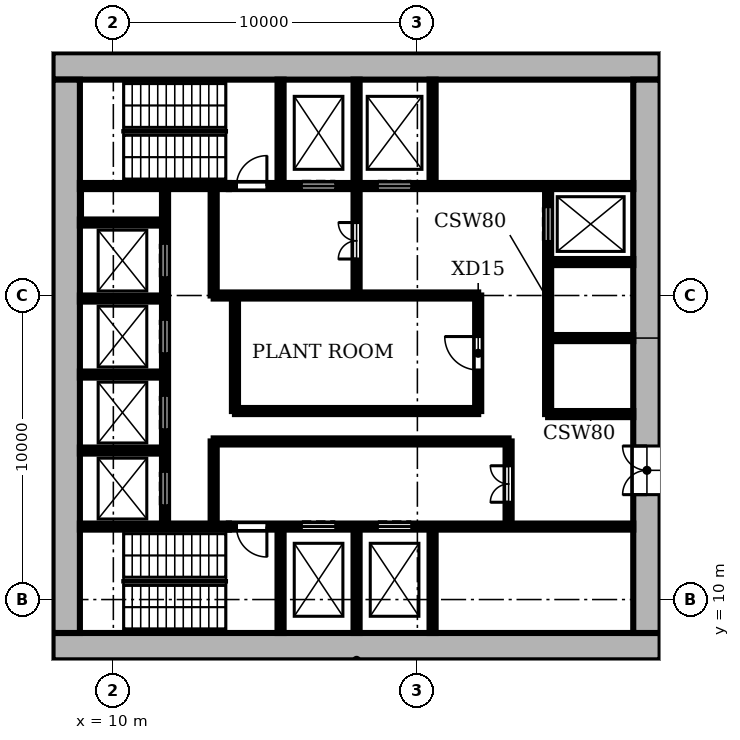
"""IFC4 building model, lengths in metres.
Left out: names, types, materials, properties, quantities, classifications, styles, units other than length and angle.
Written with IfcOpenShell. Run it as: python <this file> out.ifc"""

import sys

from ifc_helpers import new_model, si_unit, direction, frame, frame_2d, origin, place, context, subcontext, project, spatial, rectangle, extrude, element, fill, save


model = new_model("IFC4")
c1 = context("Model", 3, precision=1e-05, world=origin(), true_north=direction((0.0, 1.0)))
c2 = subcontext(c1, "Body", "Model", "MODEL_VIEW")
j1 = project(units=[si_unit("LENGTHUNIT", "METRE"), si_unit("PLANEANGLEUNIT", "RADIAN")], contexts=[c1])
p1 = place(None, origin())
s1 = spatial("IfcSite", under=j1, at=p1, CompositionType="ELEMENT")
p2 = place(p1, origin())
s2 = spatial("IfcBuilding", under=s1, at=p2, CompositionType="ELEMENT")
p3 = place(p2, frame((0.0, 0.0, -4.5)))
s3 = spatial("IfcBuildingStorey", under=s2, at=p3, CompositionType="ELEMENT", Elevation=-4.5)
p4 = place(p3, frame((8.0, 8.45, 0.0), z_axis=(0.0, 0.0, 1.0), x_axis=(1.0, 0.0, 0.0)))
e1 = element("IfcWall", 1, at=p4, inside=s3, PredefinedType="SHEAR", context=c2, shape_type="SweptSolid", body=[
    extrude(rectangle(XDim=20.0, YDim=0.9, at=frame_2d((10.0, 0.0))), origin(), (0.0, 0.0, 1.0), 4.5),
])
p5 = place(p3, frame((27.55, 8.9, 0.0), z_axis=(0.0, 0.0, 1.0), x_axis=(0.0, 1.0, 0.0)))
e2 = element("IfcWall", 2, at=p5, inside=s3, PredefinedType="SHEAR", context=c2, shape_type="SweptSolid", body=[
    extrude(rectangle(XDim=18.2, YDim=0.9, at=frame_2d((9.1, 0.0))), origin(), (0.0, 0.0, 1.0), 4.5),
])
p6 = place(p5, frame((4.55, 0.0, 0.0)))
e3 = element("IfcOpeningElement", 3, at=p6, cuts=e2, PredefinedType="OPENING", context=c2, shape_type="SweptSolid", body=[
    extrude(rectangle(XDim=1.6, YDim=2.1, at=frame_2d((0.8, 1.05))), frame((0.0, 0.46, 0.0), z_axis=(0.0, -1.0, 0.0), x_axis=(1.0, 0.0, 0.0)), (0.0, 0.0, 1.0), 0.92),
])
p7 = place(p3, frame((28.0, 27.55, 0.0), z_axis=(0.0, 0.0, 1.0), x_axis=(-1.0, 0.0, 0.0)))
e4 = element("IfcWall", 4, at=p7, inside=s3, PredefinedType="SHEAR", context=c2, shape_type="SweptSolid", body=[
    extrude(rectangle(XDim=20.0, YDim=0.9, at=frame_2d((10.0, 0.0))), origin(), (0.0, 0.0, 1.0), 4.5),
])
p8 = place(p3, frame((8.45, 27.1, 0.0), z_axis=(0.0, 0.0, 1.0), x_axis=(0.0, -1.0, 0.0)))
e5 = element("IfcWall", 5, at=p8, inside=s3, PredefinedType="SHEAR", context=c2, shape_type="SweptSolid", body=[
    extrude(rectangle(XDim=18.2, YDim=0.9, at=frame_2d((9.1, 0.0))), origin(), (0.0, 0.0, 1.0), 4.5),
])
p9 = place(p3, frame((8.9, 12.4, 0.0), z_axis=(0.0, 0.0, 1.0), x_axis=(1.0, 0.0, 0.0)))
e6 = element("IfcWall", 6, at=p9, inside=s3, PredefinedType="SHEAR", context=c2, shape_type="SweptSolid", body=[
    extrude(rectangle(XDim=4.9, YDim=0.2, at=frame_2d((2.45, 0.0))), origin(), (0.0, 0.0, 1.0), 4.05),
])
p10 = place(p3, frame((13.8, 12.4, 0.0), z_axis=(0.0, 0.0, 1.0), x_axis=(1.0, 0.0, 0.0)))
e7 = element("IfcWall", 7, at=p10, inside=s3, PredefinedType="SHEAR", context=c2, shape_type="SweptSolid", body=[
    extrude(rectangle(XDim=13.3, YDim=0.2, at=frame_2d((6.65, 0.0))), origin(), (0.0, 0.0, 1.0), 4.05),
])
p11 = place(p10, frame((2.4, 0.0, 0.0)))
e8 = element("IfcOpeningElement", 8, at=p11, cuts=e7, PredefinedType="OPENING", context=c2, shape_type="SweptSolid", body=[
    extrude(rectangle(XDim=1.1, YDim=2.1, at=frame_2d((0.55, 1.05))), frame((0.0, 0.11, 0.0), z_axis=(0.0, -1.0, 0.0), x_axis=(1.0, 0.0, 0.0)), (0.0, 0.0, 1.0), 0.22),
])
p12 = place(p10, frame((4.9, 0.0, 0.0)))
e9 = element("IfcOpeningElement", 9, at=p12, cuts=e7, PredefinedType="OPENING", context=c2, shape_type="SweptSolid", body=[
    extrude(rectangle(XDim=1.1, YDim=2.1, at=frame_2d((0.55, 1.05))), frame((0.0, 0.11, 0.0), z_axis=(0.0, -1.0, 0.0), x_axis=(1.0, 0.0, 0.0)), (0.0, 0.0, 1.0), 0.22),
])
p13 = place(p10, frame((0.25, 0.0, 0.0)))
e10 = element("IfcOpeningElement", 10, at=p13, cuts=e7, PredefinedType="OPENING", context=c2, shape_type="SweptSolid", body=[
    extrude(rectangle(XDim=1.0, YDim=2.1, at=frame_2d((0.5, 1.05))), frame((0.0, 0.11, 0.0), z_axis=(0.0, -1.0, 0.0), x_axis=(1.0, 0.0, 0.0)), (0.0, 0.0, 1.0), 0.22),
])
p14 = place(p3, frame((8.9, 14.9, 0.0), z_axis=(0.0, 0.0, 1.0), x_axis=(1.0, 0.0, 0.0)))
e11 = element("IfcWall", 11, at=p14, inside=s3, PredefinedType="SHEAR", context=c2, shape_type="SweptSolid", body=[
    extrude(rectangle(XDim=2.8, YDim=0.2, at=frame_2d((1.4, 0.0))), origin(), (0.0, 0.0, 1.0), 4.05),
])
p15 = place(p3, frame((13.3, 15.2, 0.0), z_axis=(0.0, 0.0, 1.0), x_axis=(1.0, 0.0, 0.0)))
e12 = element("IfcWall", 12, at=p15, inside=s3, PredefinedType="SHEAR", context=c2, shape_type="SweptSolid", body=[
    extrude(rectangle(XDim=9.7, YDim=0.2, at=frame_2d((4.85, 0.0))), origin(), (0.0, 0.0, 1.0), 4.05),
])
p16 = place(p3, frame((24.3, 16.1, 0.0), z_axis=(0.0, 0.0, 1.0), x_axis=(1.0, 0.0, 0.0)))
e13 = element("IfcWall", 13, at=p16, inside=s3, PredefinedType="SHEAR", context=c2, shape_type="SweptSolid", body=[
    extrude(rectangle(XDim=2.8, YDim=0.2, at=frame_2d((1.4, 0.0))), origin(), (0.0, 0.0, 1.0), 4.05),
])
p17 = place(p3, frame((14.0, 16.2, 0.0), z_axis=(0.0, 0.0, 1.0), x_axis=(1.0, 0.0, 0.0)))
e14 = element("IfcWall", 14, at=p17, inside=s3, PredefinedType="SHEAR", context=c2, shape_type="SweptSolid", body=[
    extrude(rectangle(XDim=8.0, YDim=0.2, at=frame_2d((4.0, 0.0))), origin(), (0.0, 0.0, 1.0), 4.05),
])
for number, where, z_axis, x_axis in (
    (15, (8.9, 17.4, 0.0), (0.0, 0.0, 1.0), (1.0, 0.0, 0.0)),
    (16, (24.3, 18.6, 0.0), (0.0, 0.0, 1.0), (1.0, 0.0, 0.0)),
    (17, (8.9, 19.9, 0.0), (0.0, 0.0, 1.0), (1.0, 0.0, 0.0)),
):
    element("IfcWall", number, at=place(p3, frame(where, z_axis=z_axis, x_axis=x_axis)), inside=s3, PredefinedType="SHEAR", context=c2, shape_type="SweptSolid", body=[
        extrude(rectangle(XDim=2.8, YDim=0.2, at=frame_2d((1.4, 0.0))), origin(), (0.0, 0.0, 1.0), 4.05),
    ])
p18 = place(p3, frame((13.3, 20.0, 0.0), z_axis=(0.0, 0.0, 1.0), x_axis=(1.0, 0.0, 0.0)))
e18 = element("IfcWall", 18, at=p18, inside=s3, PredefinedType="SHEAR", context=c2, shape_type="SweptSolid", body=[
    extrude(rectangle(XDim=8.7, YDim=0.2, at=frame_2d((4.35, 0.0))), origin(), (0.0, 0.0, 1.0), 4.05),
])
for number, where, z_axis, x_axis in (
    (19, (24.3, 21.1, 0.0), (0.0, 0.0, 1.0), (1.0, 0.0, 0.0)),
    (20, (8.9, 22.4, 0.0), (0.0, 0.0, 1.0), (1.0, 0.0, 0.0)),
):
    element("IfcWall", number, at=place(p3, frame(where, z_axis=z_axis, x_axis=x_axis)), inside=s3, PredefinedType="SHEAR", context=c2, shape_type="SweptSolid", body=[
        extrude(rectangle(XDim=2.8, YDim=0.2, at=frame_2d((1.4, 0.0))), origin(), (0.0, 0.0, 1.0), 4.05),
    ])
p19 = place(p3, frame((8.9, 23.6, 0.0), z_axis=(0.0, 0.0, 1.0), x_axis=(1.0, 0.0, 0.0)))
e21 = element("IfcWall", 21, at=p19, inside=s3, PredefinedType="SHEAR", context=c2, shape_type="SweptSolid", body=[
    extrude(rectangle(XDim=4.9, YDim=0.2, at=frame_2d((2.45, 0.0))), origin(), (0.0, 0.0, 1.0), 4.05),
])
p20 = place(p3, frame((13.8, 23.6, 0.0), z_axis=(0.0, 0.0, 1.0), x_axis=(1.0, 0.0, 0.0)))
e22 = element("IfcWall", 22, at=p20, inside=s3, PredefinedType="SHEAR", context=c2, shape_type="SweptSolid", body=[
    extrude(rectangle(XDim=13.3, YDim=0.2, at=frame_2d((6.65, 0.0))), origin(), (0.0, 0.0, 1.0), 4.05),
])
p21 = place(p20, frame((2.4, 0.0, 0.0)))
e23 = element("IfcOpeningElement", 23, at=p21, cuts=e22, PredefinedType="OPENING", context=c2, shape_type="SweptSolid", body=[
    extrude(rectangle(XDim=1.1, YDim=2.1, at=frame_2d((0.55, 1.05))), frame((0.0, 0.11, 0.0), z_axis=(0.0, -1.0, 0.0), x_axis=(1.0, 0.0, 0.0)), (0.0, 0.0, 1.0), 0.22),
])
p22 = place(p20, frame((4.9, 0.0, 0.0)))
e24 = element("IfcOpeningElement", 24, at=p22, cuts=e22, PredefinedType="OPENING", context=c2, shape_type="SweptSolid", body=[
    extrude(rectangle(XDim=1.1, YDim=2.1, at=frame_2d((0.55, 1.05))), frame((0.0, 0.11, 0.0), z_axis=(0.0, -1.0, 0.0), x_axis=(1.0, 0.0, 0.0)), (0.0, 0.0, 1.0), 0.22),
])
p23 = place(p20, frame((0.25, 0.0, 0.0)))
e25 = element("IfcOpeningElement", 25, at=p23, cuts=e22, PredefinedType="OPENING", context=c2, shape_type="SweptSolid", body=[
    extrude(rectangle(XDim=1.0, YDim=2.1, at=frame_2d((0.5, 1.05))), frame((0.0, 0.11, 0.0), z_axis=(0.0, -1.0, 0.0), x_axis=(1.0, 0.0, 0.0)), (0.0, 0.0, 1.0), 0.22),
])
p24 = place(p3, frame((11.7, 12.4, 0.0), z_axis=(0.0, 0.0, 1.0), x_axis=(0.0, 1.0, 0.0)))
e26 = element("IfcWall", 26, at=p24, inside=s3, PredefinedType="SHEAR", context=c2, shape_type="SweptSolid", body=[
    extrude(rectangle(XDim=11.2, YDim=0.2, at=frame_2d((5.6, 0.0))), origin(), (0.0, 0.0, 1.0), 4.05),
])
p25 = place(p24, frame((0.7, 0.0, 0.0)))
e27 = element("IfcOpeningElement", 27, at=p25, cuts=e26, PredefinedType="OPENING", context=c2, shape_type="SweptSolid", body=[
    extrude(rectangle(XDim=1.1, YDim=2.1, at=frame_2d((0.55, 1.05))), frame((0.0, 0.11, 0.0), z_axis=(0.0, -1.0, 0.0), x_axis=(1.0, 0.0, 0.0)), (0.0, 0.0, 1.0), 0.22),
])
p26 = place(p24, frame((3.2, 0.0, 0.0)))
e28 = element("IfcOpeningElement", 28, at=p26, cuts=e26, PredefinedType="OPENING", context=c2, shape_type="SweptSolid", body=[
    extrude(rectangle(XDim=1.1, YDim=2.1, at=frame_2d((0.55, 1.05))), frame((0.0, 0.11, 0.0), z_axis=(0.0, -1.0, 0.0), x_axis=(1.0, 0.0, 0.0)), (0.0, 0.0, 1.0), 0.22),
])
p27 = place(p24, frame((5.7, 0.0, 0.0)))
e29 = element("IfcOpeningElement", 29, at=p27, cuts=e26, PredefinedType="OPENING", context=c2, shape_type="SweptSolid", body=[
    extrude(rectangle(XDim=1.1, YDim=2.1, at=frame_2d((0.55, 1.05))), frame((0.0, 0.11, 0.0), z_axis=(0.0, -1.0, 0.0), x_axis=(1.0, 0.0, 0.0)), (0.0, 0.0, 1.0), 0.22),
])
p28 = place(p24, frame((8.2, 0.0, 0.0)))
e30 = element("IfcOpeningElement", 30, at=p28, cuts=e26, PredefinedType="OPENING", context=c2, shape_type="SweptSolid", body=[
    extrude(rectangle(XDim=1.1, YDim=2.1, at=frame_2d((0.55, 1.05))), frame((0.0, 0.11, 0.0), z_axis=(0.0, -1.0, 0.0), x_axis=(1.0, 0.0, 0.0)), (0.0, 0.0, 1.0), 0.22),
])
p29 = place(p3, frame((13.3, 12.4, 0.0), z_axis=(0.0, 0.0, 1.0), x_axis=(0.0, 1.0, 0.0)))
e31 = element("IfcWall", 31, at=p29, inside=s3, PredefinedType="SHEAR", context=c2, shape_type="SweptSolid", body=[
    extrude(rectangle(XDim=2.8, YDim=0.2, at=frame_2d((1.4, 0.0))), origin(), (0.0, 0.0, 1.0), 4.05),
])
p30 = place(p3, frame((13.3, 20.0, 0.0), z_axis=(0.0, 0.0, 1.0), x_axis=(0.0, 1.0, 0.0)))
e32 = element("IfcWall", 32, at=p30, inside=s3, PredefinedType="SHEAR", context=c2, shape_type="SweptSolid", body=[
    extrude(rectangle(XDim=3.6, YDim=0.2, at=frame_2d((1.8, 0.0))), origin(), (0.0, 0.0, 1.0), 4.05),
])
p31 = place(p3, frame((14.0, 16.2, 0.0), z_axis=(0.0, 0.0, 1.0), x_axis=(0.0, 1.0, 0.0)))
e33 = element("IfcWall", 33, at=p31, inside=s3, PredefinedType="SHEAR", context=c2, shape_type="SweptSolid", body=[
    extrude(rectangle(XDim=3.8, YDim=0.2, at=frame_2d((1.9, 0.0))), origin(), (0.0, 0.0, 1.0), 4.05),
])
for number, where, z_axis, x_axis in (
    (34, (15.5, 8.9, 0.0), (0.0, 0.0, 1.0), (0.0, 1.0, 0.0)),
    (35, (15.5, 23.6, 0.0), (0.0, 0.0, 1.0), (0.0, 1.0, 0.0)),
    (36, (18.0, 8.9, 0.0), (0.0, 0.0, 1.0), (0.0, 1.0, 0.0)),
):
    element("IfcWall", number, at=place(p3, frame(where, z_axis=z_axis, x_axis=x_axis)), inside=s3, PredefinedType="SHEAR", context=c2, shape_type="SweptSolid", body=[
        extrude(rectangle(XDim=3.5, YDim=0.2, at=frame_2d((1.75, 0.0))), origin(), (0.0, 0.0, 1.0), 4.05),
    ])
p32 = place(p3, frame((18.0, 20.0, 0.0), z_axis=(0.0, 0.0, 1.0), x_axis=(0.0, 1.0, 0.0)))
e37 = element("IfcWall", 37, at=p32, inside=s3, PredefinedType="SHEAR", context=c2, shape_type="SweptSolid", body=[
    extrude(rectangle(XDim=7.1, YDim=0.2, at=frame_2d((3.55, 0.0))), origin(), (0.0, 0.0, 1.0), 4.05),
])
p33 = place(p32, frame((1.2, 0.0, 0.0)))
e38 = element("IfcOpeningElement", 38, at=p33, cuts=e37, PredefinedType="OPENING", context=c2, shape_type="SweptSolid", body=[
    extrude(rectangle(XDim=1.2, YDim=2.1, at=frame_2d((0.6, 1.05))), frame((0.0, 0.11, 0.0), z_axis=(0.0, -1.0, 0.0), x_axis=(1.0, 0.0, 0.0)), (0.0, 0.0, 1.0), 0.22),
])
for number, where, z_axis, x_axis in (
    (39, (20.5, 8.9, 0.0), (0.0, 0.0, 1.0), (0.0, 1.0, 0.0)),
    (40, (20.5, 23.6, 0.0), (0.0, 0.0, 1.0), (0.0, 1.0, 0.0)),
):
    element("IfcWall", number, at=place(p3, frame(where, z_axis=z_axis, x_axis=x_axis)), inside=s3, PredefinedType="SHEAR", context=c2, shape_type="SweptSolid", body=[
        extrude(rectangle(XDim=3.5, YDim=0.2, at=frame_2d((1.75, 0.0))), origin(), (0.0, 0.0, 1.0), 4.05),
    ])
p34 = place(p3, frame((22.0, 16.2, 0.0), z_axis=(0.0, 0.0, 1.0), x_axis=(0.0, 1.0, 0.0)))
e41 = element("IfcWall", 41, at=p34, inside=s3, PredefinedType="SHEAR", context=c2, shape_type="SweptSolid", body=[
    extrude(rectangle(XDim=3.8, YDim=0.2, at=frame_2d((1.9, 0.0))), origin(), (0.0, 0.0, 1.0), 4.05),
])
p35 = place(p34, frame((1.35, 0.0, 0.0)))
e42 = element("IfcOpeningElement", 42, at=p35, cuts=e41, PredefinedType="OPENING", context=c2, shape_type="SweptSolid", body=[
    extrude(rectangle(XDim=1.1, YDim=2.1, at=frame_2d((0.55, 1.05))), frame((0.0, 0.11, 0.0), z_axis=(0.0, -1.0, 0.0), x_axis=(1.0, 0.0, 0.0)), (0.0, 0.0, 1.0), 0.22),
])
p36 = place(p3, frame((23.0, 12.4, 0.0), z_axis=(0.0, 0.0, 1.0), x_axis=(0.0, 1.0, 0.0)))
e43 = element("IfcWall", 43, at=p36, inside=s3, PredefinedType="SHEAR", context=c2, shape_type="SweptSolid", body=[
    extrude(rectangle(XDim=2.8, YDim=0.2, at=frame_2d((1.4, 0.0))), origin(), (0.0, 0.0, 1.0), 4.05),
])
p37 = place(p36, frame((0.8, 0.0, 0.0)))
e44 = element("IfcOpeningElement", 44, at=p37, cuts=e43, PredefinedType="OPENING", context=c2, shape_type="SweptSolid", body=[
    extrude(rectangle(XDim=1.2, YDim=2.1, at=frame_2d((0.6, 1.05))), frame((0.0, 0.11, 0.0), z_axis=(0.0, -1.0, 0.0), x_axis=(1.0, 0.0, 0.0)), (0.0, 0.0, 1.0), 0.22),
])
p38 = place(p3, frame((24.3, 16.1, 0.0), z_axis=(0.0, 0.0, 1.0), x_axis=(0.0, 1.0, 0.0)))
e45 = element("IfcWall", 45, at=p38, inside=s3, PredefinedType="SHEAR", context=c2, shape_type="SweptSolid", body=[
    extrude(rectangle(XDim=7.5, YDim=0.2, at=frame_2d((3.75, 0.0))), origin(), (0.0, 0.0, 1.0), 4.05),
])
p39 = place(p38, frame((5.7, 0.0, 0.0)))
e46 = element("IfcOpeningElement", 46, at=p39, cuts=e45, PredefinedType="OPENING", context=c2, shape_type="SweptSolid", body=[
    extrude(rectangle(XDim=1.1, YDim=2.1, at=frame_2d((0.55, 1.05))), frame((0.0, 0.11, 0.0), z_axis=(0.0, -1.0, 0.0), x_axis=(1.0, 0.0, 0.0)), (0.0, 0.0, 1.0), 0.22),
])
p40 = place(p25, origin())
e47 = element("IfcDoor", 47, at=p40, inside=s3, OperationType="DOUBLE_DOOR_SLIDING", PredefinedType="DOOR", context=c2, shape_type="SweptSolid", body=[
    extrude(rectangle(XDim=1.1, YDim=2.1, at=frame_2d((0.55, 1.05))), frame((0.0, 0.025, 0.0), z_axis=(0.0, -1.0, 0.0), x_axis=(1.0, 0.0, 0.0)), (0.0, 0.0, 1.0), 0.05),
])
fill(e27, e47)
p41 = place(p26, origin())
e48 = element("IfcDoor", 48, at=p41, inside=s3, OperationType="DOUBLE_DOOR_SLIDING", PredefinedType="DOOR", context=c2, shape_type="SweptSolid", body=[
    extrude(rectangle(XDim=1.1, YDim=2.1, at=frame_2d((0.55, 1.05))), frame((0.0, 0.025, 0.0), z_axis=(0.0, -1.0, 0.0), x_axis=(1.0, 0.0, 0.0)), (0.0, 0.0, 1.0), 0.05),
])
fill(e28, e48)
p42 = place(p27, origin())
e49 = element("IfcDoor", 49, at=p42, inside=s3, OperationType="DOUBLE_DOOR_SLIDING", PredefinedType="DOOR", context=c2, shape_type="SweptSolid", body=[
    extrude(rectangle(XDim=1.1, YDim=2.1, at=frame_2d((0.55, 1.05))), frame((0.0, 0.025, 0.0), z_axis=(0.0, -1.0, 0.0), x_axis=(1.0, 0.0, 0.0)), (0.0, 0.0, 1.0), 0.05),
])
fill(e29, e49)
p43 = place(p28, origin())
e50 = element("IfcDoor", 50, at=p43, inside=s3, OperationType="DOUBLE_DOOR_SLIDING", PredefinedType="DOOR", context=c2, shape_type="SweptSolid", body=[
    extrude(rectangle(XDim=1.1, YDim=2.1, at=frame_2d((0.55, 1.05))), frame((0.0, 0.025, 0.0), z_axis=(0.0, -1.0, 0.0), x_axis=(1.0, 0.0, 0.0)), (0.0, 0.0, 1.0), 0.05),
])
fill(e30, e50)
p44 = place(p39, origin())
e51 = element("IfcDoor", 51, at=p44, inside=s3, OperationType="DOUBLE_DOOR_SLIDING", PredefinedType="DOOR", context=c2, shape_type="SweptSolid", body=[
    extrude(rectangle(XDim=1.1, YDim=2.1, at=frame_2d((0.55, 1.05))), frame((0.0, 0.025, 0.0), z_axis=(0.0, -1.0, 0.0), x_axis=(1.0, 0.0, 0.0)), (0.0, 0.0, 1.0), 0.05),
])
fill(e46, e51)
p45 = place(p11, origin())
e52 = element("IfcDoor", 52, at=p45, inside=s3, OperationType="DOUBLE_DOOR_SLIDING", PredefinedType="DOOR", context=c2, shape_type="SweptSolid", body=[
    extrude(rectangle(XDim=1.1, YDim=2.1, at=frame_2d((0.55, 1.05))), frame((0.0, 0.025, 0.0), z_axis=(0.0, -1.0, 0.0), x_axis=(1.0, 0.0, 0.0)), (0.0, 0.0, 1.0), 0.05),
])
fill(e8, e52)
p46 = place(p12, origin())
e53 = element("IfcDoor", 53, at=p46, inside=s3, OperationType="DOUBLE_DOOR_SLIDING", PredefinedType="DOOR", context=c2, shape_type="SweptSolid", body=[
    extrude(rectangle(XDim=1.1, YDim=2.1, at=frame_2d((0.55, 1.05))), frame((0.0, 0.025, 0.0), z_axis=(0.0, -1.0, 0.0), x_axis=(1.0, 0.0, 0.0)), (0.0, 0.0, 1.0), 0.05),
])
fill(e9, e53)
p47 = place(p21, origin())
e54 = element("IfcDoor", 54, at=p47, inside=s3, OperationType="DOUBLE_DOOR_SLIDING", PredefinedType="DOOR", context=c2, shape_type="SweptSolid", body=[
    extrude(rectangle(XDim=1.1, YDim=2.1, at=frame_2d((0.55, 1.05))), frame((0.0, 0.025, 0.0), z_axis=(0.0, -1.0, 0.0), x_axis=(1.0, 0.0, 0.0)), (0.0, 0.0, 1.0), 0.05),
])
fill(e23, e54)
p48 = place(p22, origin())
e55 = element("IfcDoor", 55, at=p48, inside=s3, OperationType="DOUBLE_DOOR_SLIDING", PredefinedType="DOOR", context=c2, shape_type="SweptSolid", body=[
    extrude(rectangle(XDim=1.1, YDim=2.1, at=frame_2d((0.55, 1.05))), frame((0.0, 0.025, 0.0), z_axis=(0.0, -1.0, 0.0), x_axis=(1.0, 0.0, 0.0)), (0.0, 0.0, 1.0), 0.05),
])
fill(e24, e55)
p49 = place(p13, frame((1.0, 0.0, 0.0), z_axis=(0.0, 0.0, 1.0), x_axis=(-1.0, 0.0, 0.0)))
e56 = element("IfcDoor", 56, at=p49, inside=s3, OperationType="SINGLE_SWING_LEFT", PredefinedType="DOOR", context=c2, shape_type="SweptSolid", body=[
    extrude(rectangle(XDim=1.0, YDim=2.1, at=frame_2d((0.5, 1.05))), frame((0.0, 0.025, 0.0), z_axis=(0.0, -1.0, 0.0), x_axis=(1.0, 0.0, 0.0)), (0.0, 0.0, 1.0), 0.05),
])
fill(e10, e56)
p50 = place(p23, origin())
e57 = element("IfcDoor", 57, at=p50, inside=s3, OperationType="SINGLE_SWING_RIGHT", PredefinedType="DOOR", context=c2, shape_type="SweptSolid", body=[
    extrude(rectangle(XDim=1.0, YDim=2.1, at=frame_2d((0.5, 1.05))), frame((0.0, 0.025, 0.0), z_axis=(0.0, -1.0, 0.0), x_axis=(1.0, 0.0, 0.0)), (0.0, 0.0, 1.0), 0.05),
])
fill(e25, e57)
p51 = place(p37, origin())
e58 = element("IfcDoor", 58, at=p51, inside=s3, OperationType="DOUBLE_DOOR_SINGLE_SWING", PredefinedType="DOOR", context=c2, shape_type="SweptSolid", body=[
    extrude(rectangle(XDim=1.2, YDim=2.1, at=frame_2d((0.6, 1.05))), frame((0.0, 0.025, 0.0), z_axis=(0.0, -1.0, 0.0), x_axis=(1.0, 0.0, 0.0)), (0.0, 0.0, 1.0), 0.05),
])
fill(e44, e58)
p52 = place(p33, origin())
e59 = element("IfcDoor", 59, at=p52, inside=s3, OperationType="DOUBLE_DOOR_SINGLE_SWING", PredefinedType="DOOR", context=c2, shape_type="SweptSolid", body=[
    extrude(rectangle(XDim=1.2, YDim=2.1, at=frame_2d((0.6, 1.05))), frame((0.0, 0.025, 0.0), z_axis=(0.0, -1.0, 0.0), x_axis=(1.0, 0.0, 0.0)), (0.0, 0.0, 1.0), 0.05),
])
fill(e38, e59)
p53 = place(p35, origin())
e60 = element("IfcDoor", 60, at=p53, inside=s3, OperationType="SINGLE_SWING_RIGHT", PredefinedType="DOOR", context=c2, shape_type="SweptSolid", body=[
    extrude(rectangle(XDim=1.1, YDim=2.1, at=frame_2d((0.55, 1.05))), frame((0.0, 0.025, 0.0), z_axis=(0.0, -1.0, 0.0), x_axis=(1.0, 0.0, 0.0)), (0.0, 0.0, 1.0), 0.05),
])
fill(e42, e60)
p54 = place(p6, origin())
e61 = element("IfcDoor", 61, at=p54, inside=s3, OperationType="DOUBLE_DOOR_SINGLE_SWING", PredefinedType="DOOR", context=c2, shape_type="SweptSolid", body=[
    extrude(rectangle(XDim=1.6, YDim=2.1, at=frame_2d((0.8, 1.05))), frame((0.0, 0.025, 0.0), z_axis=(0.0, -1.0, 0.0), x_axis=(1.0, 0.0, 0.0)), (0.0, 0.0, 1.0), 0.05),
])
fill(e3, e61)
save(model, sys.argv[1])
